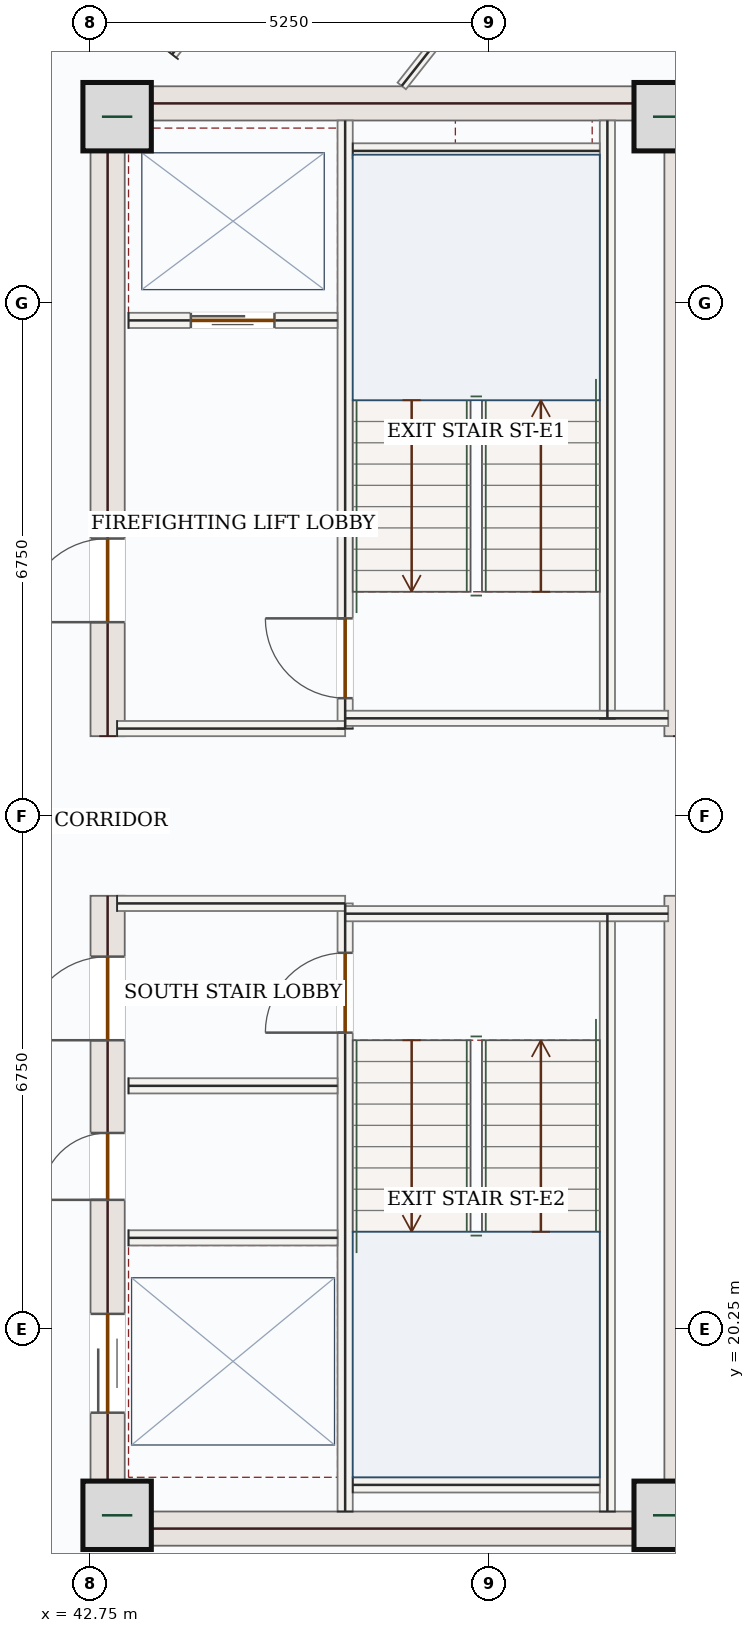
"""IFC4 building model, lengths in metres.
Left out: names, types, materials, properties, quantities, classifications, styles, units other than length and angle.
Written with IfcOpenShell. Run it as: python <this file> out.ifc"""

import sys

from ifc_helpers import new_model, si_unit, direction, frame, frame_2d, origin, origin_2d, place, context, subcontext, project, spatial, rectangle, extrude, source, transform, mapped, element, fill, save


model = new_model("IFC4")
c1 = context("Model", 3, precision=1e-05, world=origin(), true_north=direction((0.0, 1.0)))
c2 = subcontext(c1, "Body", "Model", "MODEL_VIEW")
j1 = project(units=[si_unit("LENGTHUNIT", "METRE"), si_unit("PLANEANGLEUNIT", "RADIAN")], contexts=[c1])
p1 = place(None, origin())
s1 = spatial("IfcSite", under=j1, at=p1, CompositionType="ELEMENT")
p2 = place(p1, origin())
s2 = spatial("IfcBuilding", under=s1, at=p2, CompositionType="ELEMENT")
p3 = place(p2, frame((0.0, 0.0, 327.3)))
s3 = spatial("IfcBuildingStorey", under=s2, at=p3, CompositionType="ELEMENT", Elevation=327.3)
p4 = place(p3, frame((42.975, 17.4, 0.0), z_axis=(0.0, 0.0, 1.0), x_axis=(0.0, 1.0, 0.0)))
e1 = element("IfcWall", 1, at=p4, inside=s3, PredefinedType="SHEAR", context=c2, shape_type="SweptSolid", body=[
    extrude(rectangle(XDim=8.55, YDim=0.45, at=frame_2d((4.275, 0.0))), origin(), (0.0, 0.0, 1.0), 3.5),
])
p5 = place(p4, frame((6.65, 0.0, 0.0)))
e2 = element("IfcOpeningElement", 2, at=p5, cuts=e1, PredefinedType="OPENING", context=c2, shape_type="SweptSolid", body=[
    extrude(rectangle(XDim=1.1, YDim=2.2, at=frame_2d((0.55, 1.1))), frame((0.0, 0.235, 0.0), z_axis=(0.0, -1.0, 0.0), x_axis=(1.0, 0.0, 0.0)), (0.0, 0.0, 1.0), 0.47),
])
p6 = place(p4, frame((1.75, 0.0, 0.0)))
e3 = element("IfcOpeningElement", 3, at=p6, cuts=e1, PredefinedType="OPENING", context=c2, shape_type="SweptSolid", body=[
    extrude(rectangle(XDim=1.3, YDim=2.2, at=frame_2d((0.65, 1.1))), frame((0.0, 0.235, 0.0), z_axis=(0.0, -1.0, 0.0), x_axis=(1.0, 0.0, 0.0)), (0.0, 0.0, 1.0), 0.47),
])
p7 = place(p4, frame((4.55, 0.0, 0.0)))
e4 = element("IfcOpeningElement", 4, at=p7, cuts=e1, PredefinedType="OPENING", context=c2, shape_type="SweptSolid", body=[
    extrude(rectangle(XDim=0.88, YDim=2.1, at=frame_2d((0.44, 1.05))), frame((0.0, 0.235, 0.0), z_axis=(0.0, -1.0, 0.0), x_axis=(1.0, 0.0, 0.0)), (0.0, 0.0, 1.0), 0.47),
])
p8 = place(p3, frame((42.975, 28.05, 0.0), z_axis=(0.0, 0.0, 1.0), x_axis=(0.0, 1.0, 0.0)))
e5 = element("IfcWall", 5, at=p8, inside=s3, PredefinedType="SHEAR", context=c2, shape_type="SweptSolid", body=[
    extrude(rectangle(XDim=8.55, YDim=0.45, at=frame_2d((4.275, 0.0))), origin(), (0.0, 0.0, 1.0), 3.5),
])
p9 = place(p8, frame((1.5, 0.0, 0.0)))
e6 = element("IfcOpeningElement", 6, at=p9, cuts=e5, PredefinedType="OPENING", context=c2, shape_type="SweptSolid", body=[
    extrude(rectangle(XDim=1.1, YDim=2.2, at=frame_2d((0.55, 1.1))), frame((0.0, 0.235, 0.0), z_axis=(0.0, -1.0, 0.0), x_axis=(1.0, 0.0, 0.0)), (0.0, 0.0, 1.0), 0.47),
])
m1 = source(origin(), c2, "Body", "SweptSolid", [
    extrude(rectangle(XDim=8.55, YDim=0.45, at=frame_2d((4.275, 0.0))), origin(), (0.0, 0.0, 1.0), 3.5),
])
for number, where, z_axis, x_axis in (
    (7, (50.525, 17.4, 0.0), (0.0, 0.0, 1.0), (0.0, 1.0, 0.0)),
    (8, (50.525, 28.05, 0.0), (0.0, 0.0, 1.0), (0.0, 1.0, 0.0)),
):
    element("IfcWall", number, at=place(p3, frame(where, z_axis=z_axis, x_axis=x_axis)), inside=s3, PredefinedType="SHEAR", context=c2, shape_type="MappedRepresentation", body=[
        mapped(m1, transform((0.0, 0.0, 0.0), x_axis=(1.0, 0.0, 0.0), y_axis=(0.0, 1.0, 0.0), z_axis=(0.0, 0.0, 1.0), scale=1.0)),
    ])
m2 = source(origin(), c2, "Body", "SweptSolid", [
    extrude(rectangle(XDim=7.1, YDim=0.45, at=frame_2d((3.55, 0.0))), origin(), (0.0, 0.0, 1.0), 3.5),
])
for number, where, z_axis, x_axis in (
    (9, (43.2, 17.625, 0.0), (0.0, 0.0, 1.0), (1.0, 0.0, 0.0)),
    (10, (43.2, 36.375, 0.0), (0.0, 0.0, 1.0), (1.0, 0.0, 0.0)),
):
    element("IfcWall", number, at=place(p3, frame(where, z_axis=z_axis, x_axis=x_axis)), inside=s3, PredefinedType="SHEAR", context=c2, shape_type="MappedRepresentation", body=[
        mapped(m2, transform((0.0, 0.0, 0.0), x_axis=(1.0, 0.0, 0.0), y_axis=(0.0, 1.0, 0.0), z_axis=(0.0, 0.0, 1.0), scale=1.0)),
    ])
m3 = source(origin(), c2, "Body", "SweptSolid", [
    extrude(rectangle(XDim=0.9, YDim=0.9, at=origin_2d()), origin(), (0.0, 0.0, 1.0), 3.75),
])
for number, where, z_axis, x_axis in (
    (11, (43.1, 17.8, 0.0), (0.0, 0.0, 1.0), (1.0, 0.0, 0.0)),
    (12, (50.35, 17.8, 0.0), (0.0, 0.0, 1.0), (1.0, 0.0, 0.0)),
    (13, (43.1, 36.2, 0.0), (0.0, 0.0, 1.0), (1.0, 0.0, 0.0)),
    (14, (50.35, 36.2, 0.0), (0.0, 0.0, 1.0), (1.0, 0.0, 0.0)),
):
    element("IfcColumn", number, at=place(p3, frame(where, z_axis=z_axis, x_axis=x_axis)), inside=s3, PredefinedType="COLUMN", context=c2, shape_type="MappedRepresentation", body=[
        mapped(m3, transform((0.0, 0.0, 0.0), x_axis=(1.0, 0.0, 0.0), y_axis=(0.0, 1.0, 0.0), z_axis=(0.0, 0.0, 1.0), scale=1.0)),
    ])
p10 = place(p3, frame((53.06, 18.458, 0.0), z_axis=(0.0, 0.0, 1.0), x_axis=(-0.707106781187, -0.707106781187, 0.0)))
e15 = element("IfcWall", 15, at=p10, inside=s3, PredefinedType="SOLIDWALL", context=c2, shape_type="SweptSolid", body=[
    extrude(rectangle(XDim=3.963, YDim=0.28, at=frame_2d((1.982, 0.0))), origin(), (0.0, 0.0, 1.0), 3.5),
])
p11 = place(p10, frame((1.232, 0.0, 0.85)))
e16 = element("IfcOpeningElement", 16, at=p11, cuts=e15, PredefinedType="OPENING", context=c2, shape_type="SweptSolid", body=[
    extrude(rectangle(XDim=1.5, YDim=1.5, at=frame_2d((0.75, 0.75))), frame((0.0, 0.15, 0.0), z_axis=(0.0, -1.0, 0.0), x_axis=(1.0, 0.0, 0.0)), (0.0, 0.0, 1.0), 0.3),
])
m4 = source(origin(), c2, "Body", "SweptSolid", [
    extrude(rectangle(XDim=7.87, YDim=0.2, at=frame_2d((3.935, 0.0))), origin(), (0.0, 0.0, 1.0), 3.5),
])
for number, where, z_axis, x_axis in (
    (17, (49.55, 17.85, 0.0), (0.0, 0.0, 1.0), (0.0, 1.0, 0.0)),
    (18, (49.55, 28.28, 0.0), (0.0, 0.0, 1.0), (0.0, 1.0, 0.0)),
):
    element("IfcWall", number, at=place(p3, frame(where, z_axis=z_axis, x_axis=x_axis)), inside=s3, PredefinedType="SOLIDWALL", context=c2, shape_type="MappedRepresentation", body=[
        mapped(m4, transform((0.0, 0.0, 0.0), x_axis=(1.0, 0.0, 0.0), y_axis=(0.0, 1.0, 0.0), z_axis=(0.0, 0.0, 1.0), scale=1.0)),
    ])
p12 = place(p3, frame((46.1, 17.85, 0.0), z_axis=(0.0, 0.0, 1.0), x_axis=(0.0, 1.0, 0.0)))
e19 = element("IfcWall", 19, at=p12, inside=s3, PredefinedType="SOLIDWALL", context=c2, shape_type="SweptSolid", body=[
    extrude(rectangle(XDim=8.0, YDim=0.2, at=frame_2d((4.0, 0.0))), origin(), (0.0, 0.0, 1.0), 3.5),
])
p13 = place(p12, frame((6.3, 0.0, 0.0)))
e20 = element("IfcOpeningElement", 20, at=p13, cuts=e19, PredefinedType="OPENING", context=c2, shape_type="SweptSolid", body=[
    extrude(rectangle(XDim=1.05, YDim=2.15, at=frame_2d((0.525, 1.075))), frame((0.0, 0.11, 0.0), z_axis=(0.0, -1.0, 0.0), x_axis=(1.0, 0.0, 0.0)), (0.0, 0.0, 1.0), 0.22),
])
p14 = place(p3, frame((46.1, 28.15, 0.0), z_axis=(0.0, 0.0, 1.0), x_axis=(0.0, 1.0, 0.0)))
e21 = element("IfcWall", 21, at=p14, inside=s3, PredefinedType="SOLIDWALL", context=c2, shape_type="SweptSolid", body=[
    extrude(rectangle(XDim=8.0, YDim=0.2, at=frame_2d((4.0, 0.0))), origin(), (0.0, 0.0, 1.0), 3.5),
])
p15 = place(p14, frame((0.4, 0.0, 0.0)))
e22 = element("IfcOpeningElement", 22, at=p15, cuts=e21, PredefinedType="OPENING", context=c2, shape_type="SweptSolid", body=[
    extrude(rectangle(XDim=1.05, YDim=2.15, at=frame_2d((0.525, 1.075))), frame((0.0, 0.11, 0.0), z_axis=(0.0, -1.0, 0.0), x_axis=(1.0, 0.0, 0.0)), (0.0, 0.0, 1.0), 0.22),
])
m5 = source(origin(), c2, "Body", "SweptSolid", [
    extrude(rectangle(XDim=3.0, YDim=0.2, at=frame_2d((1.5, 0.0))), origin(), (0.0, 0.0, 1.0), 3.5),
])
p16 = place(p3, frame((43.1, 25.85, 0.0), z_axis=(0.0, 0.0, 1.0), x_axis=(1.0, 0.0, 0.0)))
e23 = element("IfcWall", 23, at=p16, inside=s3, PredefinedType="SOLIDWALL", context=c2, shape_type="MappedRepresentation", body=[
    mapped(m5, transform((0.0, 0.0, 0.0), x_axis=(1.0, 0.0, 0.0), y_axis=(0.0, 1.0, 0.0), z_axis=(0.0, 0.0, 1.0), scale=1.0)),
])
m6 = source(origin(), c2, "Body", "SweptSolid", [
    extrude(rectangle(XDim=4.25, YDim=0.2, at=frame_2d((2.125, 0.0))), origin(), (0.0, 0.0, 1.0), 3.5),
])
p17 = place(p3, frame((46.1, 25.715, 0.0), z_axis=(0.0, 0.0, 1.0), x_axis=(1.0, 0.0, 0.0)))
e24 = element("IfcWall", 24, at=p17, inside=s3, PredefinedType="SOLIDWALL", context=c2, shape_type="MappedRepresentation", body=[
    mapped(m6, transform((0.0, 0.0, 0.0), x_axis=(1.0, 0.0, 0.0), y_axis=(0.0, 1.0, 0.0), z_axis=(0.0, 0.0, 1.0), scale=1.0)),
])
p18 = place(p3, frame((43.1, 28.15, 0.0), z_axis=(0.0, 0.0, 1.0), x_axis=(1.0, 0.0, 0.0)))
e25 = element("IfcWall", 25, at=p18, inside=s3, PredefinedType="SOLIDWALL", context=c2, shape_type="MappedRepresentation", body=[
    mapped(m5, transform((0.0, 0.0, 0.0), x_axis=(1.0, 0.0, 0.0), y_axis=(0.0, 1.0, 0.0), z_axis=(0.0, 0.0, 1.0), scale=1.0)),
])
p19 = place(p3, frame((46.1, 28.285, 0.0), z_axis=(0.0, 0.0, 1.0), x_axis=(1.0, 0.0, 0.0)))
e26 = element("IfcWall", 26, at=p19, inside=s3, PredefinedType="SOLIDWALL", context=c2, shape_type="MappedRepresentation", body=[
    mapped(m6, transform((0.0, 0.0, 0.0), x_axis=(1.0, 0.0, 0.0), y_axis=(0.0, 1.0, 0.0), z_axis=(0.0, 0.0, 1.0), scale=1.0)),
])
m7 = source(origin(), c2, "Body", "SweptSolid", [
    extrude(rectangle(XDim=3.25, YDim=0.2, at=frame_2d((1.625, 0.0))), origin(), (0.0, 0.0, 1.0), 3.5),
])
for number, where, z_axis, x_axis in (
    (27, (46.2, 35.75, 0.0), (0.0, 0.0, 1.0), (1.0, 0.0, 0.0)),
    (28, (46.2, 18.2, 0.0), (0.0, 0.0, 1.0), (1.0, 0.0, 0.0)),
):
    element("IfcWall", number, at=place(p3, frame(where, z_axis=z_axis, x_axis=x_axis)), inside=s3, PredefinedType="SOLIDWALL", context=c2, shape_type="MappedRepresentation", body=[
        mapped(m7, transform((0.0, 0.0, 0.0), x_axis=(1.0, 0.0, 0.0), y_axis=(0.0, 1.0, 0.0), z_axis=(0.0, 0.0, 1.0), scale=1.0)),
    ])
p20 = place(p3, frame((43.25, 33.52, 0.0), z_axis=(0.0, 0.0, 1.0), x_axis=(1.0, 0.0, 0.0)))
e29 = element("IfcWall", 29, at=p20, inside=s3, PredefinedType="SOLIDWALL", context=c2, shape_type="SweptSolid", body=[
    extrude(rectangle(XDim=2.75, YDim=0.2, at=frame_2d((1.375, 0.0))), origin(), (0.0, 0.0, 1.0), 3.5),
])
p21 = place(p20, frame((0.82, 0.0, 0.0)))
e30 = element("IfcOpeningElement", 30, at=p21, cuts=e29, PredefinedType="OPENING", context=c2, shape_type="SweptSolid", body=[
    extrude(rectangle(XDim=1.1, YDim=2.15, at=frame_2d((0.55, 1.075))), frame((0.0, 0.11, 0.0), z_axis=(0.0, -1.0, 0.0), x_axis=(1.0, 0.0, 0.0)), (0.0, 0.0, 1.0), 0.22),
])
m8 = source(origin(), c2, "Body", "SweptSolid", [
    extrude(rectangle(XDim=2.75, YDim=0.2, at=frame_2d((1.375, 0.0))), origin(), (0.0, 0.0, 1.0), 3.5),
])
for number, where, z_axis, x_axis in (
    (31, (43.25, 23.45, 0.0), (0.0, 0.0, 1.0), (1.0, 0.0, 0.0)),
    (32, (43.25, 21.45, 0.0), (0.0, 0.0, 1.0), (1.0, 0.0, 0.0)),
):
    element("IfcWall", number, at=place(p3, frame(where, z_axis=z_axis, x_axis=x_axis)), inside=s3, PredefinedType="SOLIDWALL", context=c2, shape_type="MappedRepresentation", body=[
        mapped(m8, transform((0.0, 0.0, 0.0), x_axis=(1.0, 0.0, 0.0), y_axis=(0.0, 1.0, 0.0), z_axis=(0.0, 0.0, 1.0), scale=1.0)),
    ])
m9 = source(origin(), c2, "Body", "SweptSolid", [
    extrude(rectangle(XDim=3.818, YDim=0.14, at=frame_2d((1.909, 0.0))), origin(), (0.0, 0.0, 1.0), 3.5),
])
p22 = place(p3, frame((49.208, 39.604, 0.0), z_axis=(0.0, 0.0, 1.0), x_axis=(-0.619119655452, -0.78529666511, 0.0)))
e33 = element("IfcWall", 33, at=p22, inside=s3, PredefinedType="PARTITIONING", context=c2, shape_type="MappedRepresentation", body=[
    mapped(m9, transform((0.0, 0.0, 0.0), x_axis=(1.0, 0.0, 0.0), y_axis=(0.0, 1.0, 0.0), z_axis=(0.0, 0.0, 1.0), scale=1.0)),
])
p23 = place(p3, frame((43.823, 37.02, 0.0), z_axis=(0.0, 0.0, 1.0), x_axis=(0.619105408422, 0.785307897109, 0.0)))
e34 = element("IfcWall", 34, at=p23, inside=s3, PredefinedType="PARTITIONING", context=c2, shape_type="SweptSolid", body=[
    extrude(rectangle(XDim=5.363, YDim=0.14, at=frame_2d((2.682, 0.0))), origin(), (0.0, 0.0, 1.0), 3.5),
])
p24 = place(p23, frame((0.971, 0.0, 0.0)))
e35 = element("IfcOpeningElement", 35, at=p24, cuts=e34, PredefinedType="OPENING", context=c2, shape_type="SweptSolid", body=[
    extrude(rectangle(XDim=0.95, YDim=2.15, at=frame_2d((0.475, 1.075))), frame((0.0, 0.08, 0.0), z_axis=(0.0, -1.0, 0.0), x_axis=(1.0, 0.0, 0.0)), (0.0, 0.0, 1.0), 0.16),
])
m10 = source(origin(), c2, "Body", "SweptSolid", [
    extrude(rectangle(XDim=1.05, YDim=2.15, at=frame_2d((0.525, 1.075))), frame((0.0, 0.025, 0.0), z_axis=(0.0, -1.0, 0.0), x_axis=(1.0, 0.0, 0.0)), (0.0, 0.0, 1.0), 0.05),
])
p25 = place(p15, origin())
e36 = element("IfcDoor", 36, at=p25, inside=s3, OperationType="SINGLE_SWING_RIGHT", PredefinedType="DOOR", context=c2, shape_type="MappedRepresentation", body=[
    mapped(m10, transform((0.0, 0.0, 0.0), x_axis=(1.0, 0.0, 0.0), y_axis=(0.0, 1.0, 0.0), z_axis=(0.0, 0.0, 1.0), scale=1.0)),
])
fill(e22, e36)
p26 = place(p13, origin())
e37 = element("IfcDoor", 37, at=p26, inside=s3, OperationType="SINGLE_SWING_LEFT", PredefinedType="DOOR", context=c2, shape_type="MappedRepresentation", body=[
    mapped(m10, transform((0.0, 0.0, 0.0), x_axis=(1.0, 0.0, 0.0), y_axis=(0.0, 1.0, 0.0), z_axis=(0.0, 0.0, 1.0), scale=1.0)),
])
fill(e20, e37)
m11 = source(origin(), c2, "Body", "SweptSolid", [
    extrude(rectangle(XDim=1.1, YDim=2.15, at=frame_2d((0.55, 1.075))), frame((0.0, 0.025, 0.0), z_axis=(0.0, -1.0, 0.0), x_axis=(1.0, 0.0, 0.0)), (0.0, 0.0, 1.0), 0.05),
])
p27 = place(p21, origin())
e38 = element("IfcDoor", 38, at=p27, inside=s3, OperationType="DOUBLE_DOOR_SLIDING", PredefinedType="DOOR", context=c2, shape_type="MappedRepresentation", body=[
    mapped(m11, transform((0.0, 0.0, 0.0), x_axis=(1.0, 0.0, 0.0), y_axis=(0.0, 1.0, 0.0), z_axis=(0.0, 0.0, 1.0), scale=1.0)),
])
fill(e30, e38)
m12 = source(origin(), c2, "Body", "SweptSolid", [
    extrude(rectangle(XDim=1.1, YDim=2.2, at=frame_2d((0.55, 1.1))), frame((0.0, 0.025, 0.0), z_axis=(0.0, -1.0, 0.0), x_axis=(1.0, 0.0, 0.0)), (0.0, 0.0, 1.0), 0.05),
])
p28 = place(p9, origin())
e39 = element("IfcDoor", 39, at=p28, inside=s3, OperationType="SINGLE_SWING_LEFT", PredefinedType="DOOR", context=c2, shape_type="MappedRepresentation", body=[
    mapped(m12, transform((0.0, 0.0, 0.0), x_axis=(1.0, 0.0, 0.0), y_axis=(0.0, 1.0, 0.0), z_axis=(0.0, 0.0, 1.0), scale=1.0)),
])
fill(e6, e39)
p29 = place(p5, origin())
e40 = element("IfcDoor", 40, at=p29, inside=s3, OperationType="SINGLE_SWING_LEFT", PredefinedType="DOOR", context=c2, shape_type="MappedRepresentation", body=[
    mapped(m12, transform((0.0, 0.0, 0.0), x_axis=(1.0, 0.0, 0.0), y_axis=(0.0, 1.0, 0.0), z_axis=(0.0, 0.0, 1.0), scale=1.0)),
])
fill(e2, e40)
m13 = source(origin(), c2, "Body", "SweptSolid", [
    extrude(rectangle(XDim=1.3, YDim=2.2, at=frame_2d((0.65, 1.1))), frame((0.0, 0.025, 0.0), z_axis=(0.0, -1.0, 0.0), x_axis=(1.0, 0.0, 0.0)), (0.0, 0.0, 1.0), 0.05),
])
p30 = place(p6, origin())
e41 = element("IfcDoor", 41, at=p30, inside=s3, OperationType="DOUBLE_DOOR_SLIDING", PredefinedType="DOOR", context=c2, shape_type="MappedRepresentation", body=[
    mapped(m13, transform((0.0, 0.0, 0.0), x_axis=(1.0, 0.0, 0.0), y_axis=(0.0, 1.0, 0.0), z_axis=(0.0, 0.0, 1.0), scale=1.0)),
])
fill(e3, e41)
m14 = source(origin(), c2, "Body", "SweptSolid", [
    extrude(rectangle(XDim=0.88, YDim=2.1, at=frame_2d((0.44, 1.05))), frame((0.0, 0.025, 0.0), z_axis=(0.0, -1.0, 0.0), x_axis=(1.0, 0.0, 0.0)), (0.0, 0.0, 1.0), 0.05),
])
p31 = place(p7, origin())
e42 = element("IfcDoor", 42, at=p31, inside=s3, OperationType="SINGLE_SWING_LEFT", PredefinedType="DOOR", context=c2, shape_type="MappedRepresentation", body=[
    mapped(m14, transform((0.0, 0.0, 0.0), x_axis=(1.0, 0.0, 0.0), y_axis=(0.0, 1.0, 0.0), z_axis=(0.0, 0.0, 1.0), scale=1.0)),
])
fill(e4, e42)
save(model, sys.argv[1])
